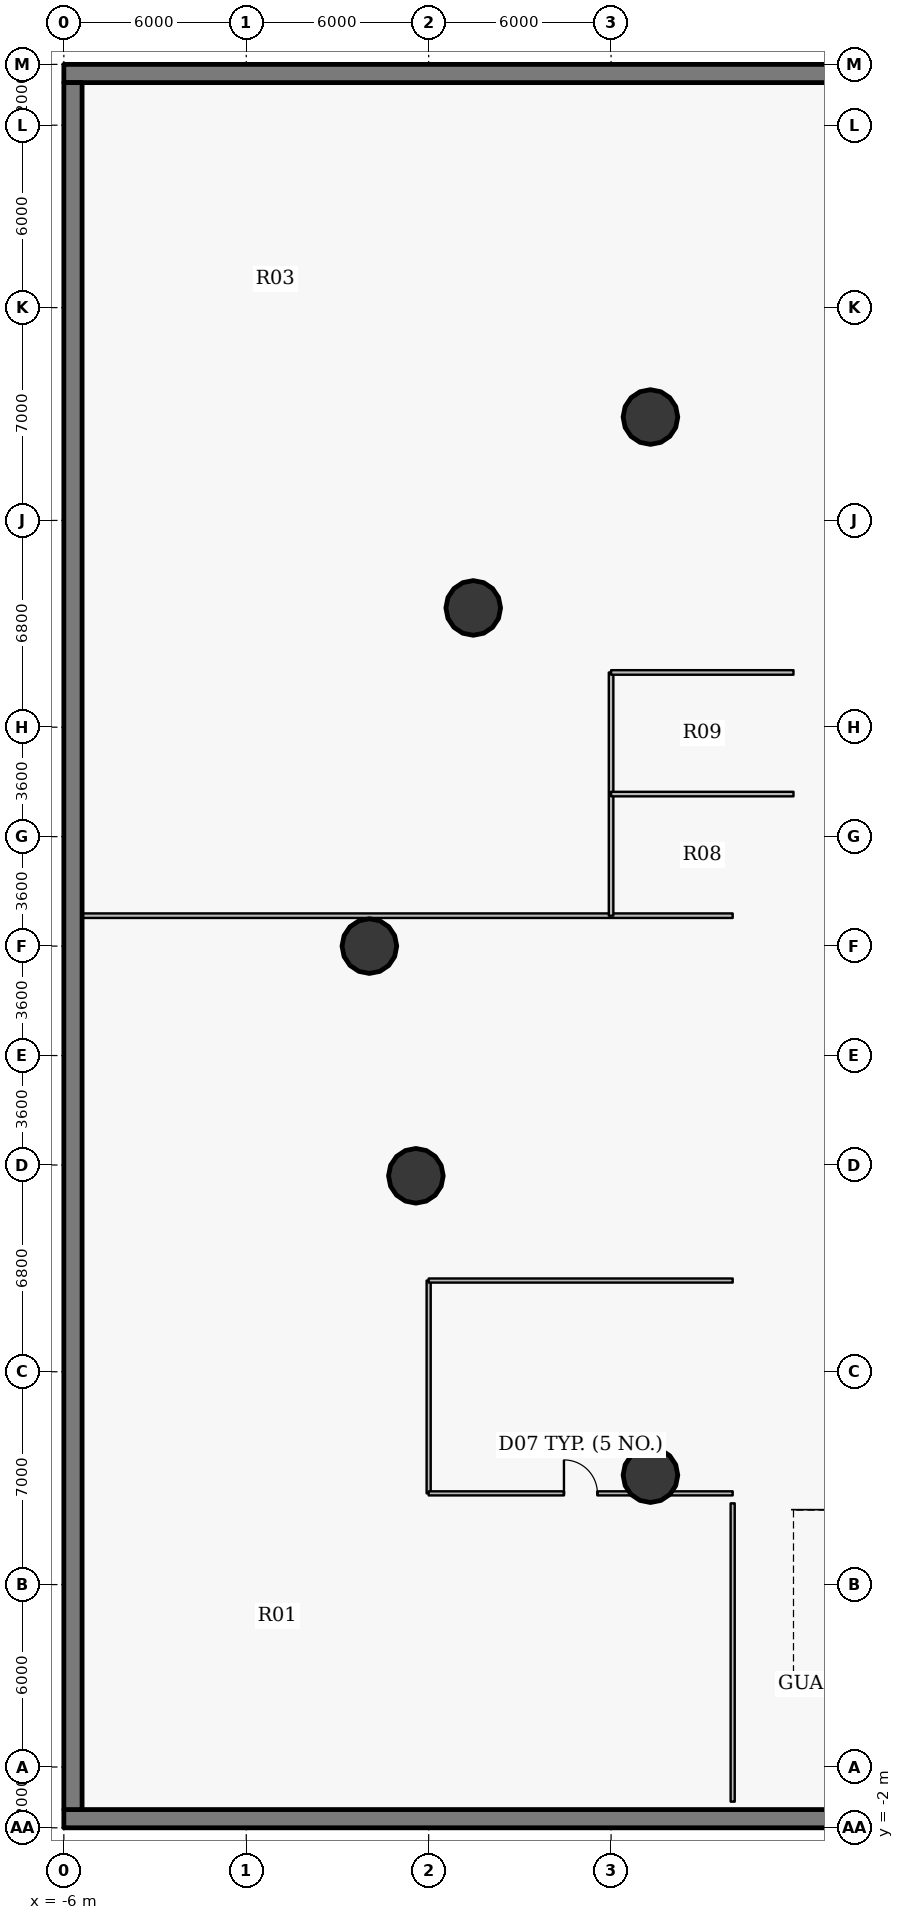
"""IFC4 building model, lengths in metres.
Left out: names, types, materials, properties, quantities, classifications, styles, units other than length and angle.
Written with IfcOpenShell. Run it as: python <this file> out.ifc"""

import sys

from ifc_helpers import new_model, si_unit, direction, frame, frame_2d, origin, origin_2d, place, context, subcontext, project, spatial, rectangle, hollow_circle, extrude, source, transform, mapped, element, fill, save


model = new_model("IFC4")
c1 = context("Model", 3, precision=1e-05, world=origin(), true_north=direction((0.0, 1.0)))
c2 = subcontext(c1, "Body", "Model", "MODEL_VIEW")
j1 = project(units=[si_unit("LENGTHUNIT", "METRE"), si_unit("PLANEANGLEUNIT", "RADIAN")], contexts=[c1])
p1 = place(None, origin())
s1 = spatial("IfcSite", under=j1, at=p1, CompositionType="ELEMENT")
p2 = place(p1, origin())
s2 = spatial("IfcBuilding", under=s1, at=p2, CompositionType="ELEMENT")
p3 = place(p2, frame((0.0, 0.0, -4.5)))
s3 = spatial("IfcBuildingStorey", under=s2, at=p3, CompositionType="ELEMENT", Elevation=-4.5)
for number, where, z_axis, x_axis in (
    (1, (-6.0, 55.7, 0.0), (0.0, 0.0, 1.0), (1.0, 0.0, 0.0)),
    (2, (78.0, -1.7, 0.0), (0.0, 0.0, 1.0), (-1.0, 0.0, 0.0)),
):
    element("IfcWall", number, at=place(p3, frame(where, z_axis=z_axis, x_axis=x_axis)), inside=s3, PredefinedType="SHEAR", context=c2, shape_type="SweptSolid", body=[
        extrude(rectangle(XDim=84.0, YDim=0.6, at=frame_2d((42.0, 0.0))), origin(), (0.0, 0.0, 1.0), 4.2),
    ])
p4 = place(p3, frame((-5.7, -1.4, 0.0), z_axis=(0.0, 0.0, 1.0), x_axis=(0.0, 1.0, 0.0)))
e3 = element("IfcWall", 3, at=p4, inside=s3, PredefinedType="SHEAR", context=c2, shape_type="SweptSolid", body=[
    extrude(rectangle(XDim=56.8, YDim=0.6, at=frame_2d((28.4, 0.0))), origin(), (0.0, 0.0, 1.0), 4.2),
])
for number, where, z_axis, x_axis in (
    (4, (13.295, 44.401, 0.0), (0.0, 0.0, 1.0), (1.0, 0.0, 0.0)),
    (5, (7.466, 38.122, 0.0), (0.0, 0.0, 1.0), (1.0, 0.0, 0.0)),
    (6, (4.05, 27.0, 0.0), (0.0, 0.0, 1.0), (1.0, 0.0, 0.0)),
    (7, (5.58, 19.445, 0.0), (0.0, 0.0, 1.0), (1.0, 0.0, 0.0)),
    (8, (13.295, 9.599, 0.0), (0.0, 0.0, 1.0), (1.0, 0.0, 0.0)),
):
    element("IfcColumn", number, at=place(p3, frame(where, z_axis=z_axis, x_axis=x_axis)), inside=s3, PredefinedType="COLUMN", context=c2, shape_type="SweptSolid", body=[
        extrude(hollow_circle(Radius=0.9, WallThickness=0.05, at=origin_2d()), origin(), (0.0, 0.0, 1.0), 4.5),
    ])
p5 = place(p3, frame((-5.4, 28.0, 0.0), z_axis=(0.0, 0.0, 1.0), x_axis=(1.0, 0.0, 0.0)))
e9 = element("IfcWall", 9, at=p5, inside=s3, PredefinedType="PARTITIONING", context=c2, shape_type="SweptSolid", body=[
    extrude(rectangle(XDim=21.4, YDim=0.15, at=frame_2d((10.7, 0.0))), origin(), (0.0, 0.0, 1.0), 2.25),
])
p6 = place(p3, frame((6.0, 9.0, 0.0), z_axis=(0.0, 0.0, 1.0), x_axis=(0.0, 1.0, 0.0)))
e10 = element("IfcWall", 10, at=p6, inside=s3, PredefinedType="PARTITIONING", context=c2, shape_type="SweptSolid", body=[
    extrude(rectangle(XDim=7.0, YDim=0.135, at=frame_2d((3.5, 0.0))), origin(), (0.0, 0.0, 1.0), 4.2),
])
p7 = place(p3, frame((6.0, 9.0, 0.0), z_axis=(0.0, 0.0, 1.0), x_axis=(1.0, 0.0, 0.0)))
e11 = element("IfcWall", 11, at=p7, inside=s3, PredefinedType="PARTITIONING", context=c2, shape_type="SweptSolid", body=[
    extrude(rectangle(XDim=10.0, YDim=0.135, at=frame_2d((5.0, 0.0))), origin(), (0.0, 0.0, 1.0), 3.385),
])
p8 = place(p7, frame((4.45, 0.0, 0.0)))
e12 = element("IfcOpeningElement", 12, at=p8, cuts=e11, PredefinedType="OPENING", context=c2, shape_type="SweptSolid", body=[
    extrude(rectangle(XDim=1.1, YDim=2.15, at=origin_2d()), frame((0.55, 0.078, 1.075), z_axis=(0.0, -1.0, 0.0), x_axis=(1.0, 0.0, 0.0)), (0.0, 0.0, 1.0), 0.155),
])
p9 = place(p3, frame((6.0, 16.0, 0.0), z_axis=(0.0, 0.0, 1.0), x_axis=(1.0, 0.0, 0.0)))
e13 = element("IfcWall", 13, at=p9, inside=s3, PredefinedType="PARTITIONING", context=c2, shape_type="SweptSolid", body=[
    extrude(rectangle(XDim=10.0, YDim=0.135, at=frame_2d((5.0, 0.0))), origin(), (0.0, 0.0, 1.0), 3.585),
])
p10 = place(p3, frame((12.0, 28.0, 0.0), z_axis=(0.0, 0.0, 1.0), x_axis=(0.0, 1.0, 0.0)))
e14 = element("IfcWall", 14, at=p10, inside=s3, PredefinedType="PARTITIONING", context=c2, shape_type="SweptSolid", body=[
    extrude(rectangle(XDim=8.0, YDim=0.15, at=frame_2d((4.0, 0.0))), origin(), (0.0, 0.0, 1.0), 2.25),
])
for number, where, z_axis, x_axis in (
    (15, (12.0, 32.0, 0.0), (0.0, 0.0, 1.0), (1.0, 0.0, 0.0)),
    (16, (12.0, 36.0, 0.0), (0.0, 0.0, 1.0), (1.0, 0.0, 0.0)),
):
    element("IfcWall", number, at=place(p3, frame(where, z_axis=z_axis, x_axis=x_axis)), inside=s3, PredefinedType="PARTITIONING", context=c2, shape_type="SweptSolid", body=[
        extrude(rectangle(XDim=6.0, YDim=0.15, at=frame_2d((3.0, 0.0))), origin(), (0.0, 0.0, 1.0), 2.25),
    ])
p11 = place(p3, frame((16.0, 8.673, 0.0), z_axis=(0.0, 0.0, 1.0), x_axis=(0.0, -1.0, 0.0)))
e17 = element("IfcWall", 17, at=p11, inside=s3, PredefinedType="PARTITIONING", context=c2, shape_type="SweptSolid", body=[
    extrude(rectangle(XDim=9.812, YDim=0.135, at=frame_2d((4.906, 0.0))), origin(), (0.0, 0.0, 1.0), 3.585),
])
m1 = source(origin(), c2, "Body", "SweptSolid", [
    extrude(rectangle(XDim=1.1, YDim=2.15, at=origin_2d()), frame((0.55, 0.025, 1.075), z_axis=(0.0, -1.0, 0.0), x_axis=(1.0, 0.0, 0.0)), (0.0, 0.0, 1.0), 0.05),
])
p12 = place(p8, origin())
e18 = element("IfcDoor", 18, at=p12, inside=s3, OperationType="SINGLE_SWING_LEFT", PredefinedType="DOOR", context=c2, shape_type="MappedRepresentation", body=[
    mapped(m1, transform((0.0, 0.0, 0.0), x_axis=(1.0, 0.0, 0.0), y_axis=(0.0, 1.0, 0.0), z_axis=(0.0, 0.0, 1.0), scale=1.0)),
])
fill(e12, e18)
save(model, sys.argv[1])
